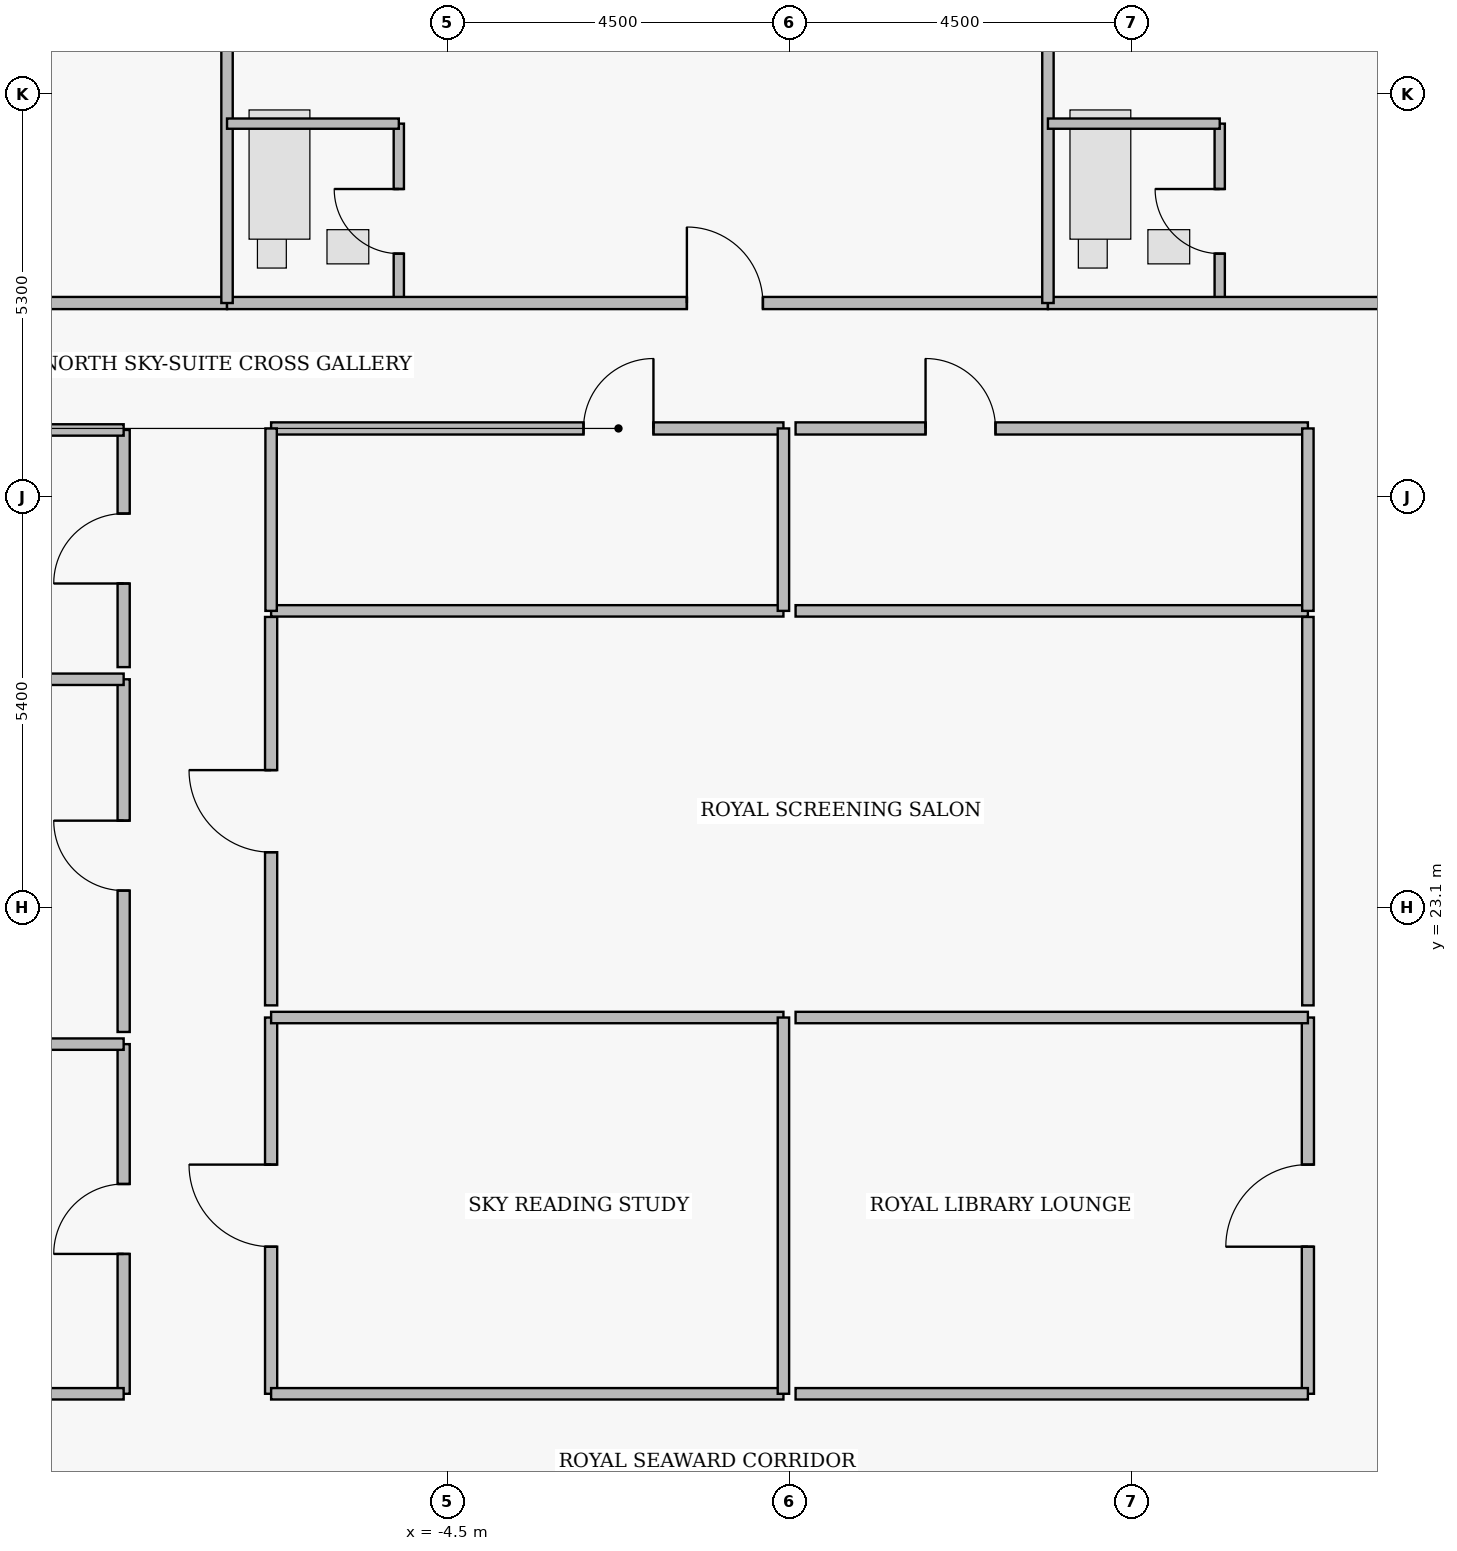
"""IFC4 building model, lengths in metres.
Left out: names, types, materials, properties, quantities, classifications, styles, units other than length and angle.
Written with IfcOpenShell. Run it as: python <this file> out.ifc"""

import sys

from ifc_helpers import new_model, si_unit, direction, frame, frame_2d, origin, place, context, subcontext, project, spatial, rectangle, extrude, element, fill, save


model = new_model("IFC4")
c1 = context("Model", 3, precision=1e-05, world=origin(), true_north=direction((0.0, 1.0)))
c2 = subcontext(c1, "Body", "Model", "MODEL_VIEW")
j1 = project(units=[si_unit("LENGTHUNIT", "METRE"), si_unit("PLANEANGLEUNIT", "RADIAN")], contexts=[c1])
p1 = place(None, origin())
s1 = spatial("IfcSite", under=j1, at=p1, CompositionType="ELEMENT")
p2 = place(p1, origin())
s2 = spatial("IfcBuilding", under=s1, at=p2, CompositionType="ELEMENT")
p3 = place(p2, frame((0.0, 0.0, 261.85)))
s3 = spatial("IfcBuildingStorey", under=s2, at=p3, CompositionType="ELEMENT", Elevation=261.85)
p4 = place(p3, frame((-20.14, 31.05, 0.0), z_axis=(0.0, 0.0, 1.0), x_axis=(1.0, 0.0, 0.0)))
e1 = element("IfcWall", 1, at=p4, inside=s3, PredefinedType="PARTITIONING", context=c2, shape_type="SweptSolid", body=[
    extrude(rectangle(XDim=12.74, YDim=0.16, at=frame_2d((6.37, 0.0))), origin(), (0.0, 0.0, 1.0), 3.48),
])
p5 = place(p4, frame((7.02, 0.0, 0.0)))
e2 = element("IfcOpeningElement", 2, at=p5, cuts=e1, PredefinedType="OPENING", context=c2, shape_type="SweptSolid", body=[
    extrude(rectangle(XDim=1.0, YDim=2.15, at=frame_2d((0.5, 1.075))), frame((0.0, 0.09, 0.0), z_axis=(0.0, -1.0, 0.0), x_axis=(1.0, 0.0, 0.0)), (0.0, 0.0, 1.0), 0.18),
])
p6 = place(p3, frame((-5.14, 31.05, 0.0), z_axis=(0.0, 0.0, 1.0), x_axis=(0.0, 1.0, 0.0)))
e3 = element("IfcWall", 3, at=p6, inside=s3, PredefinedType="PLUMBINGWALL", context=c2, shape_type="SweptSolid", body=[
    extrude(rectangle(XDim=2.36, YDim=0.135, at=frame_2d((1.18, 0.0))), origin(), (0.0, 0.0, 1.0), 3.48),
])
p7 = place(p6, frame((0.65, 0.0, 0.0)))
e4 = element("IfcOpeningElement", 4, at=p7, cuts=e3, PredefinedType="OPENING", context=c2, shape_type="SweptSolid", body=[
    extrude(rectangle(XDim=0.85, YDim=2.1, at=frame_2d((0.425, 1.05))), frame((0.0, 0.077, 0.0), z_axis=(0.0, -1.0, 0.0), x_axis=(1.0, 0.0, 0.0)), (0.0, 0.0, 1.0), 0.155),
])
p8 = place(p3, frame((-7.4, 31.05, 0.0), z_axis=(0.0, 0.0, 1.0), x_axis=(1.0, 0.0, 0.0)))
e5 = element("IfcWall", 5, at=p8, inside=s3, PredefinedType="PARTITIONING", context=c2, shape_type="SweptSolid", body=[
    extrude(rectangle(XDim=10.8, YDim=0.16, at=frame_2d((5.4, 0.0))), origin(), (0.0, 0.0, 1.0), 3.48),
])
p9 = place(p8, frame((6.05, 0.0, 0.0)))
e6 = element("IfcOpeningElement", 6, at=p9, cuts=e5, PredefinedType="OPENING", context=c2, shape_type="SweptSolid", body=[
    extrude(rectangle(XDim=1.0, YDim=2.15, at=frame_2d((0.5, 1.075))), frame((0.0, 0.09, 0.0), z_axis=(0.0, -1.0, 0.0), x_axis=(1.0, 0.0, 0.0)), (0.0, 0.0, 1.0), 0.18),
])
p10 = place(p3, frame((5.66, 31.05, 0.0), z_axis=(0.0, 0.0, 1.0), x_axis=(0.0, 1.0, 0.0)))
e7 = element("IfcWall", 7, at=p10, inside=s3, PredefinedType="PLUMBINGWALL", context=c2, shape_type="SweptSolid", body=[
    extrude(rectangle(XDim=2.36, YDim=0.135, at=frame_2d((1.18, 0.0))), origin(), (0.0, 0.0, 1.0), 3.48),
])
p11 = place(p10, frame((0.65, 0.0, 0.0)))
e8 = element("IfcOpeningElement", 8, at=p11, cuts=e7, PredefinedType="OPENING", context=c2, shape_type="SweptSolid", body=[
    extrude(rectangle(XDim=0.85, YDim=2.1, at=frame_2d((0.425, 1.05))), frame((0.0, 0.077, 0.0), z_axis=(0.0, -1.0, 0.0), x_axis=(1.0, 0.0, 0.0)), (0.0, 0.0, 1.0), 0.155),
])
p12 = place(p3, frame((3.4, 31.05, 0.0), z_axis=(0.0, 0.0, 1.0), x_axis=(1.0, 0.0, 0.0)))
e9 = element("IfcWall", 9, at=p12, inside=s3, PredefinedType="PARTITIONING", context=c2, shape_type="SweptSolid", body=[
    extrude(rectangle(XDim=8.29, YDim=0.16, at=frame_2d((4.145, 0.0))), origin(), (0.0, 0.0, 1.0), 3.48),
])
p13 = place(p12, frame((4.795, 0.0, 0.0)))
e10 = element("IfcOpeningElement", 10, at=p13, cuts=e9, PredefinedType="OPENING", context=c2, shape_type="SweptSolid", body=[
    extrude(rectangle(XDim=1.0, YDim=2.15, at=frame_2d((0.5, 1.075))), frame((0.0, 0.09, 0.0), z_axis=(0.0, -1.0, 0.0), x_axis=(1.0, 0.0, 0.0)), (0.0, 0.0, 1.0), 0.18),
])
p14 = place(p3, frame((-6.82, 29.4, 0.0), z_axis=(0.0, 0.0, 1.0), x_axis=(1.0, 0.0, 0.0)))
e11 = element("IfcWall", 11, at=p14, inside=s3, PredefinedType="PARTITIONING", context=c2, shape_type="SweptSolid", body=[
    extrude(rectangle(XDim=6.74, YDim=0.16, at=frame_2d((3.37, 0.0))), origin(), (0.0, 0.0, 1.0), 3.48),
])
p15 = place(p14, frame((4.11, 0.0, 0.0)))
e12 = element("IfcOpeningElement", 12, at=p15, cuts=e11, PredefinedType="OPENING", context=c2, shape_type="SweptSolid", body=[
    extrude(rectangle(XDim=0.92, YDim=2.12, at=frame_2d((0.46, 1.06))), frame((0.0, 0.09, 0.0), z_axis=(0.0, -1.0, 0.0), x_axis=(1.0, 0.0, 0.0)), (0.0, 0.0, 1.0), 0.18),
])
p16 = place(p3, frame((0.08, 29.4, 0.0), z_axis=(0.0, 0.0, 1.0), x_axis=(1.0, 0.0, 0.0)))
e13 = element("IfcWall", 13, at=p16, inside=s3, PredefinedType="PARTITIONING", context=c2, shape_type="SweptSolid", body=[
    extrude(rectangle(XDim=6.74, YDim=0.16, at=frame_2d((3.37, 0.0))), origin(), (0.0, 0.0, 1.0), 3.48),
])
p17 = place(p16, frame((1.71, 0.0, 0.0)))
e14 = element("IfcOpeningElement", 14, at=p17, cuts=e13, PredefinedType="OPENING", context=c2, shape_type="SweptSolid", body=[
    extrude(rectangle(XDim=0.92, YDim=2.12, at=frame_2d((0.46, 1.06))), frame((0.0, 0.09, 0.0), z_axis=(0.0, -1.0, 0.0), x_axis=(1.0, 0.0, 0.0)), (0.0, 0.0, 1.0), 0.18),
])
p18 = place(p3, frame((-6.82, 16.7, 0.0), z_axis=(0.0, 0.0, 1.0), x_axis=(0.0, 1.0, 0.0)))
e15 = element("IfcWall", 15, at=p18, inside=s3, PredefinedType="PARTITIONING", context=c2, shape_type="SweptSolid", body=[
    extrude(rectangle(XDim=4.95, YDim=0.16, at=frame_2d((2.475, 0.0))), origin(), (0.0, 0.0, 1.0), 3.48),
])
p19 = place(p18, frame((1.935, 0.0, 0.0)))
e16 = element("IfcOpeningElement", 16, at=p19, cuts=e15, PredefinedType="OPENING", context=c2, shape_type="SweptSolid", body=[
    extrude(rectangle(XDim=1.08, YDim=2.18, at=frame_2d((0.54, 1.09))), frame((0.0, 0.09, 0.0), z_axis=(0.0, -1.0, 0.0), x_axis=(1.0, 0.0, 0.0)), (0.0, 0.0, 1.0), 0.18),
])
p20 = place(p3, frame((6.82, 16.7, 0.0), z_axis=(0.0, 0.0, 1.0), x_axis=(0.0, 1.0, 0.0)))
e17 = element("IfcWall", 17, at=p20, inside=s3, PredefinedType="PARTITIONING", context=c2, shape_type="SweptSolid", body=[
    extrude(rectangle(XDim=4.95, YDim=0.16, at=frame_2d((2.475, 0.0))), origin(), (0.0, 0.0, 1.0), 3.48),
])
p21 = place(p20, frame((1.935, 0.0, 0.0)))
e18 = element("IfcOpeningElement", 18, at=p21, cuts=e17, PredefinedType="OPENING", context=c2, shape_type="SweptSolid", body=[
    extrude(rectangle(XDim=1.08, YDim=2.18, at=frame_2d((0.54, 1.09))), frame((0.0, 0.09, 0.0), z_axis=(0.0, -1.0, 0.0), x_axis=(1.0, 0.0, 0.0)), (0.0, 0.0, 1.0), 0.18),
])
p22 = place(p3, frame((-6.82, 21.81, 0.0), z_axis=(0.0, 0.0, 1.0), x_axis=(0.0, 1.0, 0.0)))
e19 = element("IfcWall", 19, at=p22, inside=s3, PredefinedType="PARTITIONING", context=c2, shape_type="SweptSolid", body=[
    extrude(rectangle(XDim=5.11, YDim=0.16, at=frame_2d((2.555, 0.0))), origin(), (0.0, 0.0, 1.0), 3.48),
])
p23 = place(p22, frame((2.015, 0.0, 0.0)))
e20 = element("IfcOpeningElement", 20, at=p23, cuts=e19, PredefinedType="OPENING", context=c2, shape_type="SweptSolid", body=[
    extrude(rectangle(XDim=1.08, YDim=2.18, at=frame_2d((0.54, 1.09))), frame((0.0, 0.09, 0.0), z_axis=(0.0, -1.0, 0.0), x_axis=(1.0, 0.0, 0.0)), (0.0, 0.0, 1.0), 0.18),
])
p24 = place(p3, frame((-8.76, 16.7, 0.0), z_axis=(0.0, 0.0, 1.0), x_axis=(0.0, 1.0, 0.0)))
e21 = element("IfcWall", 21, at=p24, inside=s3, PredefinedType="PARTITIONING", context=c2, shape_type="SweptSolid", body=[
    extrude(rectangle(XDim=4.6, YDim=0.16, at=frame_2d((2.3, 0.0))), origin(), (0.0, 0.0, 1.0), 3.48),
])
p25 = place(p24, frame((1.84, 0.0, 0.0)))
e22 = element("IfcOpeningElement", 22, at=p25, cuts=e21, PredefinedType="OPENING", context=c2, shape_type="SweptSolid", body=[
    extrude(rectangle(XDim=0.92, YDim=2.12, at=frame_2d((0.46, 1.06))), frame((0.0, 0.09, 0.0), z_axis=(0.0, -1.0, 0.0), x_axis=(1.0, 0.0, 0.0)), (0.0, 0.0, 1.0), 0.18),
])
p26 = place(p3, frame((-8.76, 21.46, 0.0), z_axis=(0.0, 0.0, 1.0), x_axis=(0.0, 1.0, 0.0)))
e23 = element("IfcWall", 23, at=p26, inside=s3, PredefinedType="PARTITIONING", context=c2, shape_type="SweptSolid", body=[
    extrude(rectangle(XDim=4.64, YDim=0.16, at=frame_2d((2.32, 0.0))), origin(), (0.0, 0.0, 1.0), 3.48),
])
p27 = place(p26, frame((1.86, 0.0, 0.0)))
e24 = element("IfcOpeningElement", 24, at=p27, cuts=e23, PredefinedType="OPENING", context=c2, shape_type="SweptSolid", body=[
    extrude(rectangle(XDim=0.92, YDim=2.12, at=frame_2d((0.46, 1.06))), frame((0.0, 0.09, 0.0), z_axis=(0.0, -1.0, 0.0), x_axis=(1.0, 0.0, 0.0)), (0.0, 0.0, 1.0), 0.18),
])
p28 = place(p3, frame((-8.76, 26.26, 0.0), z_axis=(0.0, 0.0, 1.0), x_axis=(0.0, 1.0, 0.0)))
e25 = element("IfcWall", 25, at=p28, inside=s3, PredefinedType="PARTITIONING", context=c2, shape_type="SweptSolid", body=[
    extrude(rectangle(XDim=3.12, YDim=0.16, at=frame_2d((1.56, 0.0))), origin(), (0.0, 0.0, 1.0), 3.48),
])
p29 = place(p28, frame((1.1, 0.0, 0.0)))
e26 = element("IfcOpeningElement", 26, at=p29, cuts=e25, PredefinedType="OPENING", context=c2, shape_type="SweptSolid", body=[
    extrude(rectangle(XDim=0.92, YDim=2.12, at=frame_2d((0.46, 1.06))), frame((0.0, 0.09, 0.0), z_axis=(0.0, -1.0, 0.0), x_axis=(1.0, 0.0, 0.0)), (0.0, 0.0, 1.0), 0.18),
])
p30 = place(p3, frame((-7.4, 31.05, 0.0), z_axis=(0.0, 0.0, 1.0), x_axis=(0.0, 1.0, 0.0)))
e27 = element("IfcWall", 27, at=p30, inside=s3, PredefinedType="PARTITIONING", context=c2, shape_type="SweptSolid", body=[
    extrude(rectangle(XDim=7.87, YDim=0.15, at=frame_2d((3.935, 0.0))), origin(), (0.0, 0.0, 1.0), 3.48),
])
p31 = place(p3, frame((-7.4, 33.41, 0.0), z_axis=(0.0, 0.0, 1.0), x_axis=(1.0, 0.0, 0.0)))
e28 = element("IfcWall", 28, at=p31, inside=s3, PredefinedType="PLUMBINGWALL", context=c2, shape_type="SweptSolid", body=[
    extrude(rectangle(XDim=2.26, YDim=0.135, at=frame_2d((1.13, 0.0))), origin(), (0.0, 0.0, 1.0), 3.076),
])
p32 = place(p3, frame((3.4, 31.05, 0.0), z_axis=(0.0, 0.0, 1.0), x_axis=(0.0, 1.0, 0.0)))
e29 = element("IfcWall", 29, at=p32, inside=s3, PredefinedType="PARTITIONING", context=c2, shape_type="SweptSolid", body=[
    extrude(rectangle(XDim=7.87, YDim=0.15, at=frame_2d((3.935, 0.0))), origin(), (0.0, 0.0, 1.0), 3.48),
])
p33 = place(p3, frame((3.4, 33.41, 0.0), z_axis=(0.0, 0.0, 1.0), x_axis=(1.0, 0.0, 0.0)))
e30 = element("IfcWall", 30, at=p33, inside=s3, PredefinedType="PLUMBINGWALL", context=c2, shape_type="SweptSolid", body=[
    extrude(rectangle(XDim=2.26, YDim=0.135, at=frame_2d((1.13, 0.0))), origin(), (0.0, 0.0, 1.0), 3.076),
])
p34 = place(p3, frame((-6.82, 27.0, 0.0), z_axis=(0.0, 0.0, 1.0), x_axis=(1.0, 0.0, 0.0)))
e31 = element("IfcWall", 31, at=p34, inside=s3, PredefinedType="PARTITIONING", context=c2, shape_type="SweptSolid", body=[
    extrude(rectangle(XDim=6.74, YDim=0.15, at=frame_2d((3.37, 0.0))), origin(), (0.0, 0.0, 1.0), 3.48),
])
for number, where, z_axis, x_axis in (
    (32, (-6.82, 27.0, 0.0), (0.0, 0.0, 1.0), (0.0, 1.0, 0.0)),
    (33, (-0.08, 27.0, 0.0), (0.0, 0.0, 1.0), (0.0, 1.0, 0.0)),
):
    element("IfcWall", number, at=place(p3, frame(where, z_axis=z_axis, x_axis=x_axis)), inside=s3, PredefinedType="PARTITIONING", context=c2, shape_type="SweptSolid", body=[
        extrude(rectangle(XDim=2.4, YDim=0.15, at=frame_2d((1.2, 0.0))), origin(), (0.0, 0.0, 1.0), 3.48),
    ])
p35 = place(p3, frame((0.08, 27.0, 0.0), z_axis=(0.0, 0.0, 1.0), x_axis=(1.0, 0.0, 0.0)))
e34 = element("IfcWall", 34, at=p35, inside=s3, PredefinedType="PARTITIONING", context=c2, shape_type="SweptSolid", body=[
    extrude(rectangle(XDim=6.74, YDim=0.15, at=frame_2d((3.37, 0.0))), origin(), (0.0, 0.0, 1.0), 3.48),
])
p36 = place(p3, frame((6.82, 27.0, 0.0), z_axis=(0.0, 0.0, 1.0), x_axis=(0.0, 1.0, 0.0)))
e35 = element("IfcWall", 35, at=p36, inside=s3, PredefinedType="PARTITIONING", context=c2, shape_type="SweptSolid", body=[
    extrude(rectangle(XDim=2.4, YDim=0.15, at=frame_2d((1.2, 0.0))), origin(), (0.0, 0.0, 1.0), 3.48),
])
for number, where, z_axis, x_axis in (
    (36, (-6.82, 16.7, 0.0), (0.0, 0.0, 1.0), (1.0, 0.0, 0.0)),
    (37, (-6.82, 21.65, 0.0), (0.0, 0.0, 1.0), (1.0, 0.0, 0.0)),
):
    element("IfcWall", number, at=place(p3, frame(where, z_axis=z_axis, x_axis=x_axis)), inside=s3, PredefinedType="PARTITIONING", context=c2, shape_type="SweptSolid", body=[
        extrude(rectangle(XDim=6.74, YDim=0.15, at=frame_2d((3.37, 0.0))), origin(), (0.0, 0.0, 1.0), 3.076),
    ])
p37 = place(p3, frame((-0.08, 16.7, 0.0), z_axis=(0.0, 0.0, 1.0), x_axis=(0.0, 1.0, 0.0)))
e38 = element("IfcWall", 38, at=p37, inside=s3, PredefinedType="PARTITIONING", context=c2, shape_type="SweptSolid", body=[
    extrude(rectangle(XDim=4.95, YDim=0.15, at=frame_2d((2.475, 0.0))), origin(), (0.0, 0.0, 1.0), 3.48),
])
for number, where, z_axis, x_axis in (
    (39, (0.08, 16.7, 0.0), (0.0, 0.0, 1.0), (1.0, 0.0, 0.0)),
    (40, (0.08, 21.65, 0.0), (0.0, 0.0, 1.0), (1.0, 0.0, 0.0)),
):
    element("IfcWall", number, at=place(p3, frame(where, z_axis=z_axis, x_axis=x_axis)), inside=s3, PredefinedType="PARTITIONING", context=c2, shape_type="SweptSolid", body=[
        extrude(rectangle(XDim=6.74, YDim=0.15, at=frame_2d((3.37, 0.0))), origin(), (0.0, 0.0, 1.0), 3.076),
    ])
p38 = place(p3, frame((6.82, 21.81, 0.0), z_axis=(0.0, 0.0, 1.0), x_axis=(0.0, 1.0, 0.0)))
e41 = element("IfcWall", 41, at=p38, inside=s3, PredefinedType="PARTITIONING", context=c2, shape_type="SweptSolid", body=[
    extrude(rectangle(XDim=5.11, YDim=0.15, at=frame_2d((2.555, 0.0))), origin(), (0.0, 0.0, 1.0), 3.48),
])
p39 = place(p3, frame((-21.118, 16.7, 0.0), z_axis=(0.0, 0.0, 1.0), x_axis=(1.0, 0.0, 0.0)))
e42 = element("IfcWall", 42, at=p39, inside=s3, PredefinedType="PARTITIONING", context=c2, shape_type="SweptSolid", body=[
    extrude(rectangle(XDim=12.358, YDim=0.15, at=frame_2d((6.179, 0.0))), origin(), (0.0, 0.0, 1.0), 3.076),
])
p40 = place(p3, frame((-21.662, 21.3, 0.0), z_axis=(0.0, 0.0, 1.0), x_axis=(1.0, 0.0, 0.0)))
e43 = element("IfcWall", 43, at=p40, inside=s3, PredefinedType="PARTITIONING", context=c2, shape_type="SweptSolid", body=[
    extrude(rectangle(XDim=12.902, YDim=0.15, at=frame_2d((6.451, 0.0))), origin(), (0.0, 0.0, 1.0), 3.48),
])
for number, where, z_axis, x_axis in (
    (44, (-20.14, 26.1, 0.0), (0.0, 0.0, 1.0), (1.0, 0.0, 0.0)),
    (45, (-20.14, 29.38, 0.0), (0.0, 0.0, 1.0), (1.0, 0.0, 0.0)),
):
    element("IfcWall", number, at=place(p3, frame(where, z_axis=z_axis, x_axis=x_axis)), inside=s3, PredefinedType="PARTITIONING", context=c2, shape_type="SweptSolid", body=[
        extrude(rectangle(XDim=11.38, YDim=0.15, at=frame_2d((5.69, 0.0))), origin(), (0.0, 0.0, 1.0), 3.48),
    ])
p41 = place(p7, origin())
e46 = element("IfcDoor", 46, at=p41, inside=s3, OperationType="SINGLE_SWING_RIGHT", PredefinedType="DOOR", context=c2, shape_type="SweptSolid", body=[
    extrude(rectangle(XDim=0.85, YDim=2.1, at=frame_2d((0.425, 1.05))), frame((0.0, 0.025, 0.0), z_axis=(0.0, -1.0, 0.0), x_axis=(1.0, 0.0, 0.0)), (0.0, 0.0, 1.0), 0.05),
])
fill(e4, e46)
p42 = place(p9, origin())
e47 = element("IfcDoor", 47, at=p42, inside=s3, OperationType="SINGLE_SWING_LEFT", PredefinedType="DOOR", context=c2, shape_type="SweptSolid", body=[
    extrude(rectangle(XDim=1.0, YDim=2.15, at=frame_2d((0.5, 1.075))), frame((0.0, 0.025, 0.0), z_axis=(0.0, -1.0, 0.0), x_axis=(1.0, 0.0, 0.0)), (0.0, 0.0, 1.0), 0.05),
])
fill(e6, e47)
p43 = place(p11, origin())
e48 = element("IfcDoor", 48, at=p43, inside=s3, OperationType="SINGLE_SWING_RIGHT", PredefinedType="DOOR", context=c2, shape_type="SweptSolid", body=[
    extrude(rectangle(XDim=0.85, YDim=2.1, at=frame_2d((0.425, 1.05))), frame((0.0, 0.025, 0.0), z_axis=(0.0, -1.0, 0.0), x_axis=(1.0, 0.0, 0.0)), (0.0, 0.0, 1.0), 0.05),
])
fill(e8, e48)
p44 = place(p15, origin())
e49 = element("IfcDoor", 49, at=p44, inside=s3, OperationType="SINGLE_SWING_RIGHT", PredefinedType="DOOR", context=c2, shape_type="SweptSolid", body=[
    extrude(rectangle(XDim=0.92, YDim=2.12, at=frame_2d((0.46, 1.06))), frame((0.0, 0.025, 0.0), z_axis=(0.0, -1.0, 0.0), x_axis=(1.0, 0.0, 0.0)), (0.0, 0.0, 1.0), 0.05),
])
fill(e12, e49)
p45 = place(p17, origin())
e50 = element("IfcDoor", 50, at=p45, inside=s3, OperationType="SINGLE_SWING_LEFT", PredefinedType="DOOR", context=c2, shape_type="SweptSolid", body=[
    extrude(rectangle(XDim=0.92, YDim=2.12, at=frame_2d((0.46, 1.06))), frame((0.0, 0.025, 0.0), z_axis=(0.0, -1.0, 0.0), x_axis=(1.0, 0.0, 0.0)), (0.0, 0.0, 1.0), 0.05),
])
fill(e14, e50)
p46 = place(p19, origin())
e51 = element("IfcDoor", 51, at=p46, inside=s3, OperationType="SINGLE_SWING_RIGHT", PredefinedType="DOOR", context=c2, shape_type="SweptSolid", body=[
    extrude(rectangle(XDim=1.08, YDim=2.18, at=frame_2d((0.54, 1.09))), frame((0.0, 0.025, 0.0), z_axis=(0.0, -1.0, 0.0), x_axis=(1.0, 0.0, 0.0)), (0.0, 0.0, 1.0), 0.05),
])
fill(e16, e51)
p47 = place(p21, origin())
e52 = element("IfcDoor", 52, at=p47, inside=s3, OperationType="SINGLE_SWING_LEFT", PredefinedType="DOOR", context=c2, shape_type="SweptSolid", body=[
    extrude(rectangle(XDim=1.08, YDim=2.18, at=frame_2d((0.54, 1.09))), frame((0.0, 0.025, 0.0), z_axis=(0.0, -1.0, 0.0), x_axis=(1.0, 0.0, 0.0)), (0.0, 0.0, 1.0), 0.05),
])
fill(e18, e52)
p48 = place(p23, origin())
e53 = element("IfcDoor", 53, at=p48, inside=s3, OperationType="SINGLE_SWING_RIGHT", PredefinedType="DOOR", context=c2, shape_type="SweptSolid", body=[
    extrude(rectangle(XDim=1.08, YDim=2.18, at=frame_2d((0.54, 1.09))), frame((0.0, 0.025, 0.0), z_axis=(0.0, -1.0, 0.0), x_axis=(1.0, 0.0, 0.0)), (0.0, 0.0, 1.0), 0.05),
])
fill(e20, e53)
p49 = place(p25, origin())
e54 = element("IfcDoor", 54, at=p49, inside=s3, OperationType="SINGLE_SWING_LEFT", PredefinedType="DOOR", context=c2, shape_type="SweptSolid", body=[
    extrude(rectangle(XDim=0.92, YDim=2.12, at=frame_2d((0.46, 1.06))), frame((0.0, 0.025, 0.0), z_axis=(0.0, -1.0, 0.0), x_axis=(1.0, 0.0, 0.0)), (0.0, 0.0, 1.0), 0.05),
])
fill(e22, e54)
p50 = place(p27, origin())
e55 = element("IfcDoor", 55, at=p50, inside=s3, OperationType="SINGLE_SWING_RIGHT", PredefinedType="DOOR", context=c2, shape_type="SweptSolid", body=[
    extrude(rectangle(XDim=0.92, YDim=2.12, at=frame_2d((0.46, 1.06))), frame((0.0, 0.025, 0.0), z_axis=(0.0, -1.0, 0.0), x_axis=(1.0, 0.0, 0.0)), (0.0, 0.0, 1.0), 0.05),
])
fill(e24, e55)
p51 = place(p29, origin())
e56 = element("IfcDoor", 56, at=p51, inside=s3, OperationType="SINGLE_SWING_LEFT", PredefinedType="DOOR", context=c2, shape_type="SweptSolid", body=[
    extrude(rectangle(XDim=0.92, YDim=2.12, at=frame_2d((0.46, 1.06))), frame((0.0, 0.025, 0.0), z_axis=(0.0, -1.0, 0.0), x_axis=(1.0, 0.0, 0.0)), (0.0, 0.0, 1.0), 0.05),
])
fill(e26, e56)
save(model, sys.argv[1])
